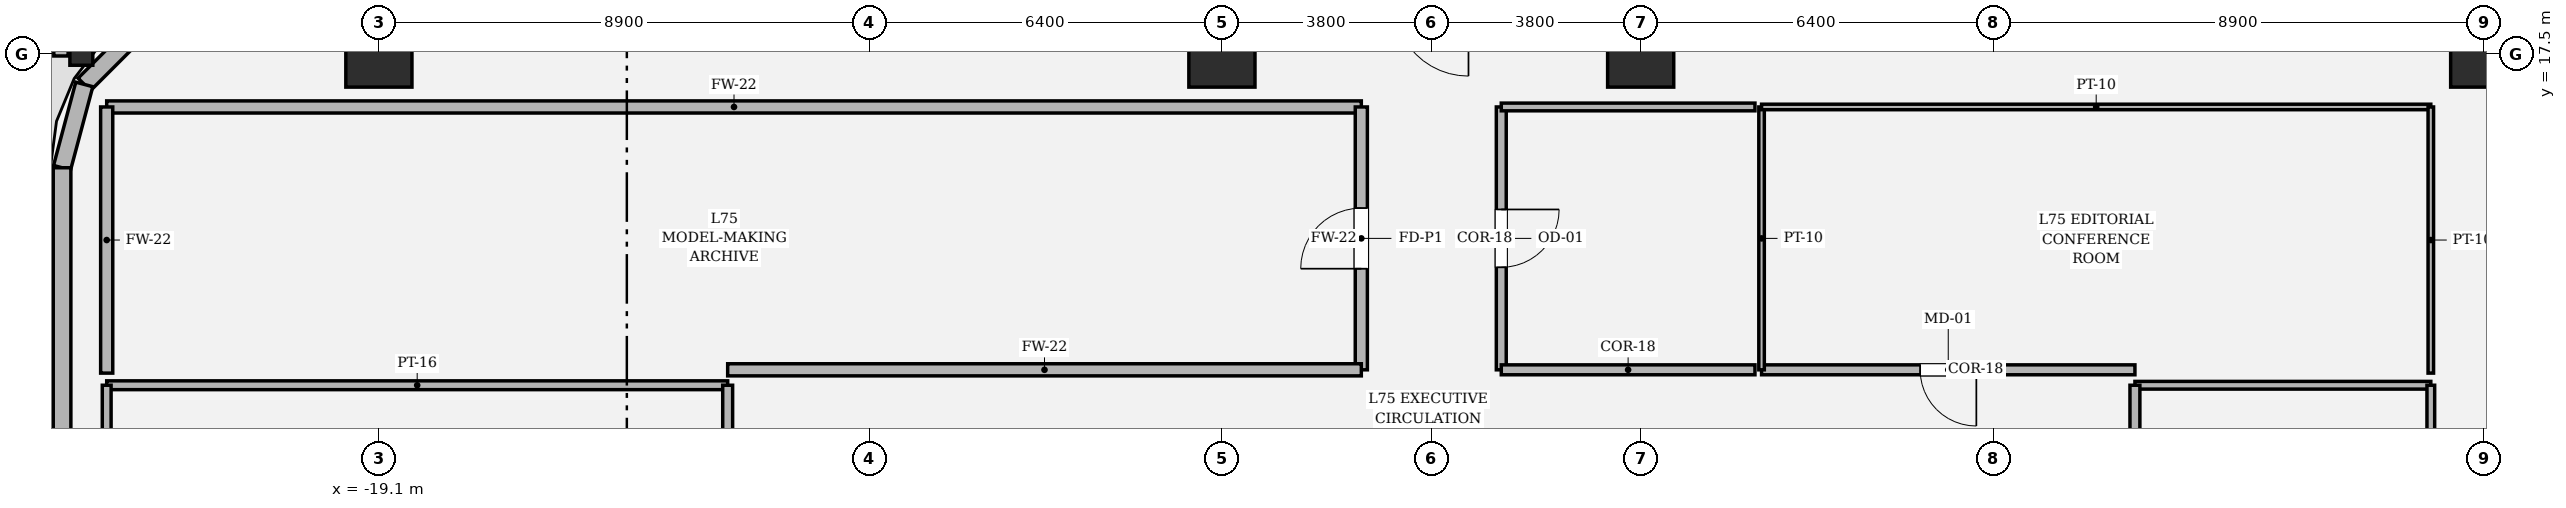
"""IFC4 building model, lengths in metres.
Left out: names, types, materials, properties, quantities, classifications, styles, units other than length and angle.
Written with IfcOpenShell. Run it as: python <this file> out.ifc"""

import sys

from ifc_helpers import new_model, si_unit, direction, frame, frame_2d, origin, origin_2d, place, context, subcontext, project, spatial, rectangle, hollow_rectangle, i_section, extrude, element, fill, save


model = new_model("IFC4")
c1 = context("Model", 3, precision=1e-05, world=origin(), true_north=direction((0.0, 1.0)))
c2 = subcontext(c1, "Body", "Model", "MODEL_VIEW")
j1 = project(units=[si_unit("LENGTHUNIT", "METRE"), si_unit("PLANEANGLEUNIT", "RADIAN")], contexts=[c1])
p1 = place(None, origin())
s1 = spatial("IfcSite", under=j1, at=p1, CompositionType="ELEMENT")
p2 = place(p1, origin())
s2 = spatial("IfcBuilding", under=s1, at=p2, CompositionType="ELEMENT")
p3 = place(p2, frame((0.0, 0.0, 317.4)))
s3 = spatial("IfcBuildingStorey", under=s2, at=p3, CompositionType="ELEMENT", Elevation=317.4)
for number, where, z_axis, x_axis in (
    (1, (19.1, 17.5, 0.0), (0.0, 0.0, 1.0), (1.0, 0.0, 0.0)),
    (2, (3.8, 17.5, 0.0), (0.0, 0.0, 1.0), (1.0, 0.0, 0.0)),
    (3, (-3.8, 17.5, 0.0), (0.0, 0.0, 1.0), (1.0, 0.0, 0.0)),
    (4, (-19.1, 17.5, 0.0), (0.0, 0.0, 1.0), (1.0, 0.0, 0.0)),
):
    element("IfcColumn", number, at=place(p3, frame(where, z_axis=z_axis, x_axis=x_axis)), inside=s3, PredefinedType="COLUMN", context=c2, shape_type="SweptSolid", body=[
        extrude(hollow_rectangle(XDim=1.2, YDim=1.2, WallThickness=0.035, at=origin_2d()), origin(), (0.0, 0.0, 1.0), 4.2),
    ])
p4 = place(p3, frame((-24.5, 17.5, 0.0), z_axis=(0.0, 0.0, 1.0), x_axis=(0.0, 1.0, 0.0)))
e5 = element("IfcColumn", 5, at=p4, inside=s3, PredefinedType="COLUMN", context=c2, shape_type="SweptSolid", body=[
    extrude(i_section(OverallWidth=0.406, OverallDepth=0.416, WebThickness=0.029, FlangeThickness=0.048, FilletRadius=0.018, at=origin_2d()), origin(), (0.0, 0.0, 1.0), 4.198),
])
p5 = place(p3, frame((19.646, 16.949, 0.0), z_axis=(0.0, 0.0, 1.0), x_axis=(-0.707106781187, 0.707106781187, 0.0)))
e6 = element("IfcWall", 6, at=p5, inside=s3, PredefinedType="SOLIDWALL", context=c2, shape_type="SweptSolid", body=[
    extrude(rectangle(XDim=1.552, YDim=0.32, at=frame_2d((0.776, 0.0))), origin(), (0.0, 0.0, 1.0), 3.394),
])
p6 = place(p3, frame((-23.349, 18.047, 0.0), z_axis=(0.0, 0.0, 1.0), x_axis=(-0.707106781187, -0.707106781187, 0.0)))
e7 = element("IfcWall", 7, at=p6, inside=s3, PredefinedType="SOLIDWALL", context=c2, shape_type="SweptSolid", body=[
    extrude(rectangle(XDim=1.552, YDim=0.32, at=frame_2d((0.776, 0.0))), origin(), (0.0, 0.0, 1.0), 2.674),
])
p7 = place(p3, frame((-24.447, 16.949, 0.0), z_axis=(0.0, 0.0, 1.0), x_axis=(-0.257847112249, -0.966185730957, 0.0)))
e8 = element("IfcWall", 8, at=p7, inside=s3, PredefinedType="SOLIDWALL", context=c2, shape_type="SweptSolid", body=[
    extrude(rectangle(XDim=1.565, YDim=0.32, at=frame_2d((0.783, 0.0))), origin(), (0.0, 0.0, 1.0), 2.714),
])
p8 = place(p3, frame((-24.85, 15.437, 0.0), z_axis=(0.0, 0.0, 1.0), x_axis=(0.0, -1.0, 0.0)))
e9 = element("IfcWall", 9, at=p8, inside=s3, PredefinedType="SOLIDWALL", context=c2, shape_type="SweptSolid", body=[
    extrude(rectangle(XDim=12.687, YDim=0.32, at=frame_2d((6.344, 0.0))), origin(), (0.0, 0.0, 1.0), 2.714),
])
p9 = place(p3, frame((-24.87, 20.238, 0.0), z_axis=(0.0, 0.0, 1.0), x_axis=(0.0, -1.0, 0.0)))
e10 = element("IfcWall", 10, at=p9, inside=s3, PredefinedType="PARAPET", context=c2, shape_type="SweptSolid", body=[
    extrude(rectangle(XDim=2.773, YDim=0.26, at=frame_2d((1.387, 0.0))), origin(), (0.0, 0.0, 1.0), 1.2),
])
p10 = place(p3, frame((-24.04, 11.49, 0.0), z_axis=(0.0, 0.0, 1.0), x_axis=(1.0, 0.0, 0.0)))
e11 = element("IfcWall", 11, at=p10, inside=s3, PredefinedType="PARTITIONING", context=c2, shape_type="SweptSolid", body=[
    extrude(rectangle(XDim=11.27, YDim=0.16, at=frame_2d((5.635, 0.0))), origin(), (0.0, 0.0, 1.0), 3.394),
])
p11 = place(p3, frame((-12.77, 11.49, 0.0), z_axis=(0.0, 0.0, 1.0), x_axis=(0.0, -1.0, 0.0)))
e12 = element("IfcWall", 12, at=p11, inside=s3, PredefinedType="PARTITIONING", context=c2, shape_type="SweptSolid", body=[
    extrude(rectangle(XDim=14.664, YDim=0.18, at=frame_2d((7.332, 0.0))), origin(), (0.0, 0.0, 1.0), 3.394),
])
p12 = place(p11, frame((6.807, 0.0, 0.0)))
e13 = element("IfcOpeningElement", 13, at=p12, cuts=e12, PredefinedType="OPENING", context=c2, shape_type="SweptSolid", body=[
    extrude(rectangle(XDim=1.05, YDim=2.2, at=frame_2d((0.525, 1.1))), frame((0.0, 0.1, 0.0), z_axis=(0.0, -1.0, 0.0), x_axis=(1.0, 0.0, 0.0)), (0.0, 0.0, 1.0), 0.2),
])
p13 = place(p3, frame((-24.04, -3.174, 0.0), z_axis=(0.0, 0.0, 1.0), x_axis=(0.0, 1.0, 0.0)))
e14 = element("IfcWall", 14, at=p13, inside=s3, PredefinedType="PARTITIONING", context=c2, shape_type="SweptSolid", body=[
    extrude(rectangle(XDim=14.664, YDim=0.16, at=frame_2d((7.332, 0.0))), origin(), (0.0, 0.0, 1.0), 2.674),
])
p14 = place(p3, frame((12.77, 11.49, 0.0), z_axis=(0.0, 0.0, 1.0), x_axis=(1.0, 0.0, 0.0)))
e15 = element("IfcWall", 15, at=p14, inside=s3, PredefinedType="PARTITIONING", context=c2, shape_type="SweptSolid", body=[
    extrude(rectangle(XDim=5.37, YDim=0.14, at=frame_2d((2.685, 0.0))), origin(), (0.0, 0.0, 1.0), 3.634),
])
p15 = place(p3, frame((18.14, 11.49, 0.0), z_axis=(0.0, 0.0, 1.0), x_axis=(0.0, -1.0, 0.0)))
e16 = element("IfcWall", 16, at=p15, inside=s3, PredefinedType="PARTITIONING", context=c2, shape_type="SweptSolid", body=[
    extrude(rectangle(XDim=11.43, YDim=0.14, at=frame_2d((5.715, 0.0))), origin(), (0.0, 0.0, 1.0), 3.394),
])
p16 = place(p3, frame((12.77, 0.06, 0.0), z_axis=(0.0, 0.0, 1.0), x_axis=(0.0, 1.0, 0.0)))
e17 = element("IfcWall", 17, at=p16, inside=s3, PredefinedType="PARTITIONING", context=c2, shape_type="SweptSolid", body=[
    extrude(rectangle(XDim=11.43, YDim=0.18, at=frame_2d((5.715, 0.0))), origin(), (0.0, 0.0, 1.0), 3.394),
])
p17 = place(p16, frame((5.19, 0.0, 0.0)))
e18 = element("IfcOpeningElement", 18, at=p17, cuts=e17, PredefinedType="OPENING", context=c2, shape_type="SweptSolid", body=[
    extrude(rectangle(XDim=1.05, YDim=2.2, at=frame_2d((0.525, 1.1))), frame((0.0, 0.1, 0.0), z_axis=(0.0, -1.0, 0.0), x_axis=(1.0, 0.0, 0.0)), (0.0, 0.0, 1.0), 0.2),
])
p18 = place(p3, frame((-24.04, 16.54, 0.0), z_axis=(0.0, 0.0, 1.0), x_axis=(1.0, 0.0, 0.0)))
e19 = element("IfcWall", 19, at=p18, inside=s3, PredefinedType="SOLIDWALL", context=c2, shape_type="SweptSolid", body=[
    extrude(rectangle(XDim=22.77, YDim=0.22, at=frame_2d((11.385, 0.0))), origin(), (0.0, 0.0, 1.0), 3.394),
])
p19 = place(p3, frame((-1.27, 16.54, 0.0), z_axis=(0.0, 0.0, 1.0), x_axis=(0.0, -1.0, 0.0)))
e20 = element("IfcWall", 20, at=p19, inside=s3, PredefinedType="SOLIDWALL", context=c2, shape_type="SweptSolid", body=[
    extrude(rectangle(XDim=4.77, YDim=0.22, at=frame_2d((2.385, 0.0))), origin(), (0.0, 0.0, 1.0), 4.0),
])
p20 = place(p19, frame((1.835, 0.0, 0.0)))
e21 = element("IfcOpeningElement", 21, at=p20, cuts=e20, PredefinedType="OPENING", context=c2, shape_type="SweptSolid", body=[
    extrude(rectangle(XDim=1.1, YDim=2.2, at=frame_2d((0.55, 1.1))), frame((0.0, 0.12, 0.0), z_axis=(0.0, -1.0, 0.0), x_axis=(1.0, 0.0, 0.0)), (0.0, 0.0, 1.0), 0.24),
])
p21 = place(p3, frame((-1.27, 11.77, 0.0), z_axis=(0.0, 0.0, 1.0), x_axis=(-1.0, 0.0, 0.0)))
e22 = element("IfcWall", 22, at=p21, inside=s3, PredefinedType="SOLIDWALL", context=c2, shape_type="SweptSolid", body=[
    extrude(rectangle(XDim=11.5, YDim=0.22, at=frame_2d((5.75, 0.0))), origin(), (0.0, 0.0, 1.0), 3.394),
])
p22 = place(p3, frame((-24.04, 11.71, 0.0), z_axis=(0.0, 0.0, 1.0), x_axis=(0.0, 1.0, 0.0)))
e23 = element("IfcWall", 23, at=p22, inside=s3, PredefinedType="SOLIDWALL", context=c2, shape_type="SweptSolid", body=[
    extrude(rectangle(XDim=4.83, YDim=0.22, at=frame_2d((2.415, 0.0))), origin(), (0.0, 0.0, 1.0), 4.0),
])
p23 = place(p3, frame((12.77, 11.77, 0.0), z_axis=(0.0, 0.0, 1.0), x_axis=(-1.0, 0.0, 0.0)))
e24 = element("IfcWall", 24, at=p23, inside=s3, PredefinedType="PARTITIONING", context=c2, shape_type="SweptSolid", body=[
    extrude(rectangle(XDim=6.776, YDim=0.18, at=frame_2d((3.388, 0.0))), origin(), (0.0, 0.0, 1.0), 3.394),
])
p24 = place(p23, frame((2.878, 0.0, 0.0)))
e25 = element("IfcOpeningElement", 25, at=p24, cuts=e24, PredefinedType="OPENING", context=c2, shape_type="SweptSolid", body=[
    extrude(rectangle(XDim=1.02, YDim=2.2, at=frame_2d((0.51, 1.1))), frame((0.0, 0.1, 0.0), z_axis=(0.0, -1.0, 0.0), x_axis=(1.0, 0.0, 0.0)), (0.0, 0.0, 1.0), 0.2),
])
p25 = place(p3, frame((5.994, 11.77, 0.0), z_axis=(0.0, 0.0, 1.0), x_axis=(0.0, 1.0, 0.0)))
e26 = element("IfcWall", 26, at=p25, inside=s3, PredefinedType="PARTITIONING", context=c2, shape_type="SweptSolid", body=[
    extrude(rectangle(XDim=4.77, YDim=0.1, at=frame_2d((2.385, 0.0))), origin(), (0.0, 0.0, 1.0), 4.0),
])
p26 = place(p3, frame((5.994, 16.54, 0.0), z_axis=(0.0, 0.0, 1.0), x_axis=(1.0, 0.0, 0.0)))
e27 = element("IfcWall", 27, at=p26, inside=s3, PredefinedType="PARTITIONING", context=c2, shape_type="SweptSolid", body=[
    extrude(rectangle(XDim=12.146, YDim=0.1, at=frame_2d((6.073, 0.0))), origin(), (0.0, 0.0, 1.0), 3.394),
])
p27 = place(p3, frame((18.14, 16.54, 0.0), z_axis=(0.0, 0.0, 1.0), x_axis=(0.0, -1.0, 0.0)))
e28 = element("IfcWall", 28, at=p27, inside=s3, PredefinedType="PARTITIONING", context=c2, shape_type="SweptSolid", body=[
    extrude(rectangle(XDim=4.83, YDim=0.1, at=frame_2d((2.415, 0.0))), origin(), (0.0, 0.0, 1.0), 3.634),
])
p28 = place(p3, frame((1.27, 11.77, 0.0), z_axis=(0.0, 0.0, 1.0), x_axis=(0.0, 1.0, 0.0)))
e29 = element("IfcWall", 29, at=p28, inside=s3, PredefinedType="PARTITIONING", context=c2, shape_type="SweptSolid", body=[
    extrude(rectangle(XDim=4.77, YDim=0.18, at=frame_2d((2.385, 0.0))), origin(), (0.0, 0.0, 1.0), 4.0),
])
p29 = place(p28, frame((1.86, 0.0, 0.0)))
e30 = element("IfcOpeningElement", 30, at=p29, cuts=e29, PredefinedType="OPENING", context=c2, shape_type="SweptSolid", body=[
    extrude(rectangle(XDim=1.05, YDim=2.2, at=frame_2d((0.525, 1.1))), frame((0.0, 0.1, 0.0), z_axis=(0.0, -1.0, 0.0), x_axis=(1.0, 0.0, 0.0)), (0.0, 0.0, 1.0), 0.2),
])
p30 = place(p3, frame((1.27, 16.54, 0.0), z_axis=(0.0, 0.0, 1.0), x_axis=(1.0, 0.0, 0.0)))
e31 = element("IfcWall", 31, at=p30, inside=s3, PredefinedType="PARTITIONING", context=c2, shape_type="SweptSolid", body=[
    extrude(rectangle(XDim=4.604, YDim=0.14, at=frame_2d((2.302, 0.0))), origin(), (0.0, 0.0, 1.0), 3.394),
])
p31 = place(p3, frame((5.874, 11.77, 0.0), z_axis=(0.0, 0.0, 1.0), x_axis=(-1.0, 0.0, 0.0)))
e32 = element("IfcWall", 32, at=p31, inside=s3, PredefinedType="PARTITIONING", context=c2, shape_type="SweptSolid", body=[
    extrude(rectangle(XDim=4.604, YDim=0.18, at=frame_2d((2.302, 0.0))), origin(), (0.0, 0.0, 1.0), 3.394),
])
p32 = place(p20, origin())
e33 = element("IfcDoor", 33, at=p32, inside=s3, OperationType="SINGLE_SWING_RIGHT", PredefinedType="DOOR", context=c2, shape_type="SweptSolid", body=[
    extrude(rectangle(XDim=1.1, YDim=2.2, at=frame_2d((0.55, 1.1))), frame((0.0, 0.025, 0.0), z_axis=(0.0, -1.0, 0.0), x_axis=(1.0, 0.0, 0.0)), (0.0, 0.0, 1.0), 0.05),
])
fill(e21, e33)
p33 = place(p24, origin())
e34 = element("IfcDoor", 34, at=p33, inside=s3, OperationType="SINGLE_SWING_LEFT", PredefinedType="DOOR", context=c2, shape_type="SweptSolid", body=[
    extrude(rectangle(XDim=1.02, YDim=2.2, at=frame_2d((0.51, 1.1))), frame((0.0, 0.025, 0.0), z_axis=(0.0, -1.0, 0.0), x_axis=(1.0, 0.0, 0.0)), (0.0, 0.0, 1.0), 0.05),
])
fill(e25, e34)
p34 = place(p29, origin())
e35 = element("IfcDoor", 35, at=p34, inside=s3, OperationType="SINGLE_SWING_RIGHT", PredefinedType="DOOR", context=c2, shape_type="SweptSolid", body=[
    extrude(rectangle(XDim=1.05, YDim=2.2, at=frame_2d((0.525, 1.1))), frame((0.0, 0.025, 0.0), z_axis=(0.0, -1.0, 0.0), x_axis=(1.0, 0.0, 0.0)), (0.0, 0.0, 1.0), 0.05),
])
fill(e30, e35)
save(model, sys.argv[1])
